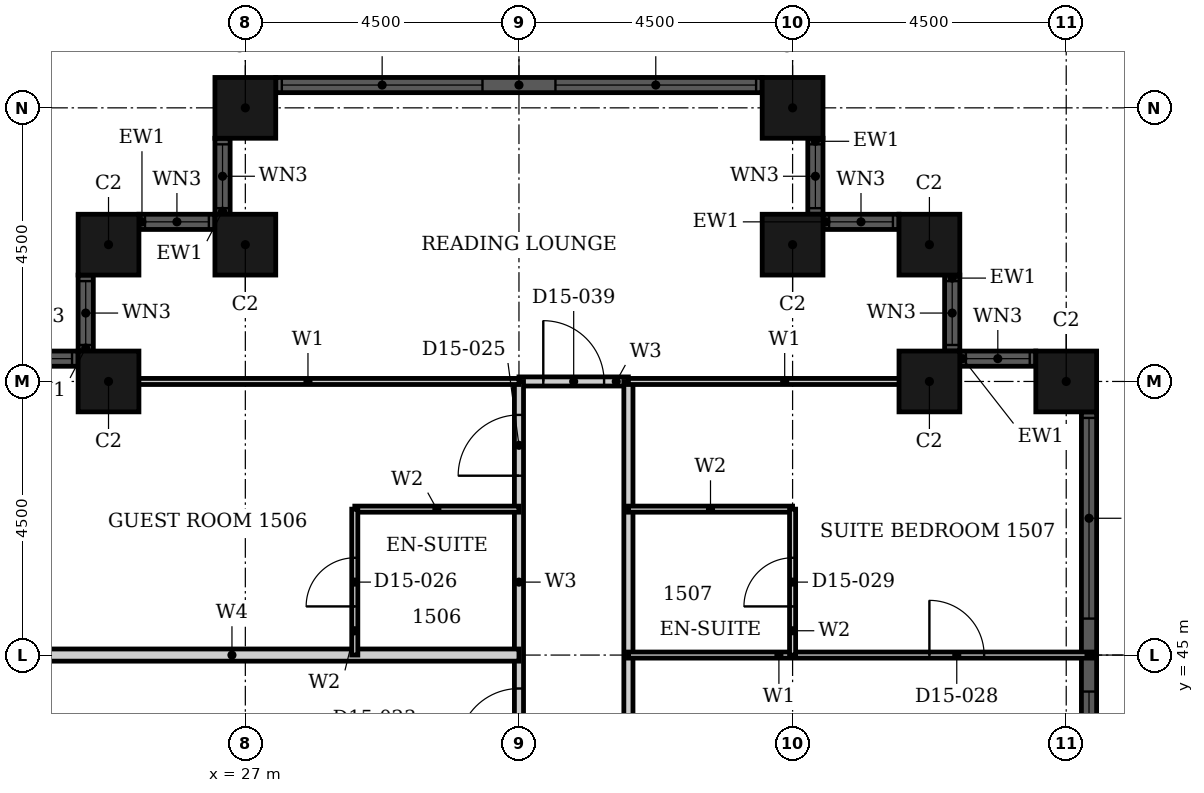
"""IFC4 building model, lengths in metres.
Left out: names, types, materials, properties, quantities, classifications, styles, units other than length and angle.
Written with IfcOpenShell. Run it as: python <this file> out.ifc"""

import sys

from ifc_helpers import new_model, si_unit, direction, frame, frame_2d, origin, origin_2d, place, context, subcontext, project, spatial, rectangle, hollow_rectangle, extrude, element, fill, save


model = new_model("IFC4")
c1 = context("Model", 3, precision=1e-05, world=origin(), true_north=direction((0.0, 1.0)))
c2 = subcontext(c1, "Body", "Model", "MODEL_VIEW")
j1 = project(units=[si_unit("LENGTHUNIT", "METRE"), si_unit("PLANEANGLEUNIT", "RADIAN")], contexts=[c1])
p1 = place(None, origin())
s1 = spatial("IfcSite", under=j1, at=p1, CompositionType="ELEMENT")
p2 = place(p1, origin())
s2 = spatial("IfcBuilding", under=s1, at=p2, CompositionType="ELEMENT")
p3 = place(p2, frame((0.0, 0.0, 67.2)))
s3 = spatial("IfcBuildingStorey", under=s2, at=p3, CompositionType="ELEMENT", Elevation=67.2)
for number, where, z_axis, x_axis in (
    (1, (40.5, 49.5, 0.0), (0.0, 0.0, 1.0), (1.0, 0.0, 0.0)),
    (2, (38.25, 49.5, 0.0), (0.0, 0.0, 1.0), (1.0, 0.0, 0.0)),
    (3, (38.25, 51.75, 0.0), (0.0, 0.0, 1.0), (1.0, 0.0, 0.0)),
    (4, (36.0, 51.75, 0.0), (0.0, 0.0, 1.0), (1.0, 0.0, 0.0)),
    (5, (36.0, 54.0, 0.0), (0.0, 0.0, 1.0), (1.0, 0.0, 0.0)),
    (6, (27.0, 54.0, 0.0), (0.0, 0.0, 1.0), (1.0, 0.0, 0.0)),
    (7, (27.0, 51.75, 0.0), (0.0, 0.0, 1.0), (1.0, 0.0, 0.0)),
    (8, (24.75, 51.75, 0.0), (0.0, 0.0, 1.0), (1.0, 0.0, 0.0)),
    (9, (24.75, 49.5, 0.0), (0.0, 0.0, 1.0), (1.0, 0.0, 0.0)),
):
    element("IfcColumn", number, at=place(p3, frame(where, z_axis=z_axis, x_axis=x_axis)), inside=s3, PredefinedType="COLUMN", context=c2, shape_type="SweptSolid", body=[
        extrude(hollow_rectangle(XDim=1.0, YDim=1.0, WallThickness=0.032, at=origin_2d()), origin(), (0.0, 0.0, 1.0), 3.6),
    ])
p4 = place(p3, frame((40.875, 41.0, 0.0), z_axis=(0.0, 0.0, 1.0), x_axis=(0.0, 1.0, 0.0)))
e10 = element("IfcWall", 10, at=p4, inside=s3, PredefinedType="SOLIDWALL", context=c2, shape_type="SweptSolid", body=[
    extrude(rectangle(XDim=8.0, YDim=0.25, at=frame_2d((4.0, 0.0))), origin(), (0.0, 0.0, 1.0), 3.6),
])
p5 = place(p4, frame((0.1, 0.0, 0.9)))
e11 = element("IfcOpeningElement", 11, at=p5, cuts=e10, PredefinedType="OPENING", context=c2, shape_type="SweptSolid", body=[
    extrude(rectangle(XDim=3.3, YDim=2.08, at=frame_2d((1.65, 1.04))), frame((0.0, 0.135, 0.0), z_axis=(0.0, -1.0, 0.0), x_axis=(1.0, 0.0, 0.0)), (0.0, 0.0, 1.0), 0.27),
])
p6 = place(p4, frame((4.6, 0.0, 0.9)))
e12 = element("IfcOpeningElement", 12, at=p6, cuts=e10, PredefinedType="OPENING", context=c2, shape_type="SweptSolid", body=[
    extrude(rectangle(XDim=3.3, YDim=2.08, at=frame_2d((1.65, 1.04))), frame((0.0, 0.135, 0.0), z_axis=(0.0, -1.0, 0.0), x_axis=(1.0, 0.0, 0.0)), (0.0, 0.0, 1.0), 0.27),
])
p7 = place(p3, frame((40.0, 49.875, 0.0), z_axis=(0.0, 0.0, 1.0), x_axis=(-1.0, 0.0, 0.0)))
e13 = element("IfcWall", 13, at=p7, inside=s3, PredefinedType="SOLIDWALL", context=c2, shape_type="SweptSolid", body=[
    extrude(rectangle(XDim=1.25, YDim=0.25, at=frame_2d((0.625, 0.0))), origin(), (0.0, 0.0, 1.0), 3.6),
])
p8 = place(p7, frame((0.1, 0.0, 0.9)))
e14 = element("IfcOpeningElement", 14, at=p8, cuts=e13, PredefinedType="OPENING", context=c2, shape_type="SweptSolid", body=[
    extrude(rectangle(XDim=1.05, YDim=2.08, at=frame_2d((0.525, 1.04))), frame((0.0, 0.135, 0.0), z_axis=(0.0, -1.0, 0.0), x_axis=(1.0, 0.0, 0.0)), (0.0, 0.0, 1.0), 0.27),
])
p9 = place(p3, frame((38.625, 50.0, 0.0), z_axis=(0.0, 0.0, 1.0), x_axis=(0.0, 1.0, 0.0)))
e15 = element("IfcWall", 15, at=p9, inside=s3, PredefinedType="SOLIDWALL", context=c2, shape_type="SweptSolid", body=[
    extrude(rectangle(XDim=1.25, YDim=0.25, at=frame_2d((0.625, 0.0))), origin(), (0.0, 0.0, 1.0), 3.6),
])
p10 = place(p9, frame((0.1, 0.0, 0.9)))
e16 = element("IfcOpeningElement", 16, at=p10, cuts=e15, PredefinedType="OPENING", context=c2, shape_type="SweptSolid", body=[
    extrude(rectangle(XDim=1.05, YDim=2.08, at=frame_2d((0.525, 1.04))), frame((0.0, 0.135, 0.0), z_axis=(0.0, -1.0, 0.0), x_axis=(1.0, 0.0, 0.0)), (0.0, 0.0, 1.0), 0.27),
])
p11 = place(p3, frame((37.75, 52.125, 0.0), z_axis=(0.0, 0.0, 1.0), x_axis=(-1.0, 0.0, 0.0)))
e17 = element("IfcWall", 17, at=p11, inside=s3, PredefinedType="SOLIDWALL", context=c2, shape_type="SweptSolid", body=[
    extrude(rectangle(XDim=1.25, YDim=0.25, at=frame_2d((0.625, 0.0))), origin(), (0.0, 0.0, 1.0), 3.6),
])
p12 = place(p11, frame((0.1, 0.0, 0.9)))
e18 = element("IfcOpeningElement", 18, at=p12, cuts=e17, PredefinedType="OPENING", context=c2, shape_type="SweptSolid", body=[
    extrude(rectangle(XDim=1.05, YDim=2.08, at=frame_2d((0.525, 1.04))), frame((0.0, 0.135, 0.0), z_axis=(0.0, -1.0, 0.0), x_axis=(1.0, 0.0, 0.0)), (0.0, 0.0, 1.0), 0.27),
])
p13 = place(p3, frame((36.375, 52.25, 0.0), z_axis=(0.0, 0.0, 1.0), x_axis=(0.0, 1.0, 0.0)))
e19 = element("IfcWall", 19, at=p13, inside=s3, PredefinedType="SOLIDWALL", context=c2, shape_type="SweptSolid", body=[
    extrude(rectangle(XDim=1.25, YDim=0.25, at=frame_2d((0.625, 0.0))), origin(), (0.0, 0.0, 1.0), 3.6),
])
p14 = place(p13, frame((0.1, 0.0, 0.9)))
e20 = element("IfcOpeningElement", 20, at=p14, cuts=e19, PredefinedType="OPENING", context=c2, shape_type="SweptSolid", body=[
    extrude(rectangle(XDim=1.05, YDim=2.08, at=frame_2d((0.525, 1.04))), frame((0.0, 0.135, 0.0), z_axis=(0.0, -1.0, 0.0), x_axis=(1.0, 0.0, 0.0)), (0.0, 0.0, 1.0), 0.27),
])
p15 = place(p3, frame((35.5, 54.375, 0.0), z_axis=(0.0, 0.0, 1.0), x_axis=(-1.0, 0.0, 0.0)))
e21 = element("IfcWall", 21, at=p15, inside=s3, PredefinedType="SOLIDWALL", context=c2, shape_type="SweptSolid", body=[
    extrude(rectangle(XDim=8.0, YDim=0.25, at=frame_2d((4.0, 0.0))), origin(), (0.0, 0.0, 1.0), 3.6),
])
p16 = place(p15, frame((0.1, 0.0, 0.9)))
e22 = element("IfcOpeningElement", 22, at=p16, cuts=e21, PredefinedType="OPENING", context=c2, shape_type="SweptSolid", body=[
    extrude(rectangle(XDim=3.3, YDim=2.08, at=frame_2d((1.65, 1.04))), frame((0.0, 0.135, 0.0), z_axis=(0.0, -1.0, 0.0), x_axis=(1.0, 0.0, 0.0)), (0.0, 0.0, 1.0), 0.27),
])
p17 = place(p15, frame((4.6, 0.0, 0.9)))
e23 = element("IfcOpeningElement", 23, at=p17, cuts=e21, PredefinedType="OPENING", context=c2, shape_type="SweptSolid", body=[
    extrude(rectangle(XDim=3.3, YDim=2.08, at=frame_2d((1.65, 1.04))), frame((0.0, 0.135, 0.0), z_axis=(0.0, -1.0, 0.0), x_axis=(1.0, 0.0, 0.0)), (0.0, 0.0, 1.0), 0.27),
])
p18 = place(p3, frame((26.625, 53.5, 0.0), z_axis=(0.0, 0.0, 1.0), x_axis=(0.0, -1.0, 0.0)))
e24 = element("IfcWall", 24, at=p18, inside=s3, PredefinedType="SOLIDWALL", context=c2, shape_type="SweptSolid", body=[
    extrude(rectangle(XDim=1.25, YDim=0.25, at=frame_2d((0.625, 0.0))), origin(), (0.0, 0.0, 1.0), 3.6),
])
p19 = place(p18, frame((0.1, 0.0, 0.9)))
e25 = element("IfcOpeningElement", 25, at=p19, cuts=e24, PredefinedType="OPENING", context=c2, shape_type="SweptSolid", body=[
    extrude(rectangle(XDim=1.05, YDim=2.08, at=frame_2d((0.525, 1.04))), frame((0.0, 0.135, 0.0), z_axis=(0.0, -1.0, 0.0), x_axis=(1.0, 0.0, 0.0)), (0.0, 0.0, 1.0), 0.27),
])
p20 = place(p3, frame((26.5, 52.125, 0.0), z_axis=(0.0, 0.0, 1.0), x_axis=(-1.0, 0.0, 0.0)))
e26 = element("IfcWall", 26, at=p20, inside=s3, PredefinedType="SOLIDWALL", context=c2, shape_type="SweptSolid", body=[
    extrude(rectangle(XDim=1.25, YDim=0.25, at=frame_2d((0.625, 0.0))), origin(), (0.0, 0.0, 1.0), 3.6),
])
p21 = place(p20, frame((0.1, 0.0, 0.9)))
e27 = element("IfcOpeningElement", 27, at=p21, cuts=e26, PredefinedType="OPENING", context=c2, shape_type="SweptSolid", body=[
    extrude(rectangle(XDim=1.05, YDim=2.08, at=frame_2d((0.525, 1.04))), frame((0.0, 0.135, 0.0), z_axis=(0.0, -1.0, 0.0), x_axis=(1.0, 0.0, 0.0)), (0.0, 0.0, 1.0), 0.27),
])
p22 = place(p3, frame((24.375, 51.25, 0.0), z_axis=(0.0, 0.0, 1.0), x_axis=(0.0, -1.0, 0.0)))
e28 = element("IfcWall", 28, at=p22, inside=s3, PredefinedType="SOLIDWALL", context=c2, shape_type="SweptSolid", body=[
    extrude(rectangle(XDim=1.25, YDim=0.25, at=frame_2d((0.625, 0.0))), origin(), (0.0, 0.0, 1.0), 3.6),
])
p23 = place(p22, frame((0.1, 0.0, 0.9)))
e29 = element("IfcOpeningElement", 29, at=p23, cuts=e28, PredefinedType="OPENING", context=c2, shape_type="SweptSolid", body=[
    extrude(rectangle(XDim=1.05, YDim=2.08, at=frame_2d((0.525, 1.04))), frame((0.0, 0.135, 0.0), z_axis=(0.0, -1.0, 0.0), x_axis=(1.0, 0.0, 0.0)), (0.0, 0.0, 1.0), 0.27),
])
p24 = place(p3, frame((24.25, 49.875, 0.0), z_axis=(0.0, 0.0, 1.0), x_axis=(-1.0, 0.0, 0.0)))
e30 = element("IfcWall", 30, at=p24, inside=s3, PredefinedType="SOLIDWALL", context=c2, shape_type="SweptSolid", body=[
    extrude(rectangle(XDim=1.25, YDim=0.25, at=frame_2d((0.625, 0.0))), origin(), (0.0, 0.0, 1.0), 3.6),
])
p25 = place(p24, frame((0.1, 0.0, 0.9)))
e31 = element("IfcOpeningElement", 31, at=p25, cuts=e30, PredefinedType="OPENING", context=c2, shape_type="SweptSolid", body=[
    extrude(rectangle(XDim=1.05, YDim=2.08, at=frame_2d((0.525, 1.04))), frame((0.0, 0.135, 0.0), z_axis=(0.0, -1.0, 0.0), x_axis=(1.0, 0.0, 0.0)), (0.0, 0.0, 1.0), 0.27),
])
p26 = place(p3, frame((31.5, 49.5, 0.0), z_axis=(0.0, 0.0, 1.0), x_axis=(1.0, 0.0, 0.0)))
e32 = element("IfcWall", 32, at=p26, inside=s3, PredefinedType="PARTITIONING", context=c2, shape_type="SweptSolid", body=[
    extrude(rectangle(XDim=1.8, YDim=0.15, at=frame_2d((0.9, 0.0))), origin(), (0.0, 0.0, 1.0), 3.3),
])
p27 = place(p26, frame((0.4, 0.0, 0.0)))
e33 = element("IfcOpeningElement", 33, at=p27, cuts=e32, PredefinedType="OPENING", context=c2, shape_type="SweptSolid", body=[
    extrude(rectangle(XDim=1.0, YDim=2.1, at=frame_2d((0.5, 1.05))), frame((0.0, 0.085, 0.0), z_axis=(0.0, -1.0, 0.0), x_axis=(1.0, 0.0, 0.0)), (0.0, 0.0, 1.0), 0.17),
])
p28 = place(p3, frame((31.5, 40.5, 0.0), z_axis=(0.0, 0.0, 1.0), x_axis=(0.0, 1.0, 0.0)))
e34 = element("IfcWall", 34, at=p28, inside=s3, PredefinedType="PARTITIONING", context=c2, shape_type="SweptSolid", body=[
    extrude(rectangle(XDim=9.0, YDim=0.15, at=frame_2d((4.5, 0.0))), origin(), (0.0, 0.0, 1.0), 2.58),
])
p29 = place(p28, frame((2.95, 0.0, 0.0)))
e35 = element("IfcOpeningElement", 35, at=p29, cuts=e34, PredefinedType="OPENING", context=c2, shape_type="SweptSolid", body=[
    extrude(rectangle(XDim=1.0, YDim=2.1, at=frame_2d((0.5, 1.05))), frame((0.0, 0.085, 0.0), z_axis=(0.0, -1.0, 0.0), x_axis=(1.0, 0.0, 0.0)), (0.0, 0.0, 1.0), 0.17),
])
p30 = place(p28, frame((7.45, 0.0, 0.0)))
e36 = element("IfcOpeningElement", 36, at=p30, cuts=e34, PredefinedType="OPENING", context=c2, shape_type="SweptSolid", body=[
    extrude(rectangle(XDim=1.0, YDim=2.1, at=frame_2d((0.5, 1.05))), frame((0.0, 0.085, 0.0), z_axis=(0.0, -1.0, 0.0), x_axis=(1.0, 0.0, 0.0)), (0.0, 0.0, 1.0), 0.17),
])
p31 = place(p3, frame((33.3, 33.3, 0.0), z_axis=(0.0, 0.0, 1.0), x_axis=(0.0, 1.0, 0.0)))
e37 = element("IfcWall", 37, at=p31, inside=s3, PredefinedType="PARTITIONING", context=c2, shape_type="SweptSolid", body=[
    extrude(rectangle(XDim=16.2, YDim=0.15, at=frame_2d((8.1, 0.0))), origin(), (0.0, 0.0, 1.0), 3.3),
])
p32 = place(p31, frame((8.95, 0.0, 0.0)))
e38 = element("IfcOpeningElement", 38, at=p32, cuts=e37, PredefinedType="OPENING", context=c2, shape_type="SweptSolid", body=[
    extrude(rectangle(XDim=1.0, YDim=2.1, at=frame_2d((0.5, 1.05))), frame((0.0, 0.085, 0.0), z_axis=(0.0, -1.0, 0.0), x_axis=(1.0, 0.0, 0.0)), (0.0, 0.0, 1.0), 0.17),
])
p33 = place(p3, frame((33.3, 45.0, 0.0), z_axis=(0.0, 0.0, 1.0), x_axis=(1.0, 0.0, 0.0)))
e39 = element("IfcWall", 39, at=p33, inside=s3, PredefinedType="PARTITIONING", context=c2, shape_type="SweptSolid", body=[
    extrude(rectangle(XDim=7.64, YDim=0.1, at=frame_2d((3.82, 0.0))), origin(), (0.0, 0.0, 1.0), 3.3),
])
p34 = place(p33, frame((4.95, 0.0, 0.0)))
e40 = element("IfcOpeningElement", 40, at=p34, cuts=e39, PredefinedType="OPENING", context=c2, shape_type="SweptSolid", body=[
    extrude(rectangle(XDim=0.9, YDim=2.1, at=frame_2d((0.45, 1.05))), frame((0.0, 0.06, 0.0), z_axis=(0.0, -1.0, 0.0), x_axis=(1.0, 0.0, 0.0)), (0.0, 0.0, 1.0), 0.12),
])
p35 = place(p3, frame((24.56, 49.5, 0.0), z_axis=(0.0, 0.0, 1.0), x_axis=(1.0, 0.0, 0.0)))
e41 = element("IfcWall", 41, at=p35, inside=s3, PredefinedType="PARTITIONING", context=c2, shape_type="SweptSolid", body=[
    extrude(rectangle(XDim=6.94, YDim=0.1, at=frame_2d((3.47, 0.0))), origin(), (0.0, 0.0, 1.0), 3.3),
])
p36 = place(p3, frame((33.3, 49.5, 0.0), z_axis=(0.0, 0.0, 1.0), x_axis=(1.0, 0.0, 0.0)))
e42 = element("IfcWall", 42, at=p36, inside=s3, PredefinedType="PARTITIONING", context=c2, shape_type="SweptSolid", body=[
    extrude(rectangle(XDim=5.14, YDim=0.1, at=frame_2d((2.57, 0.0))), origin(), (0.0, 0.0, 1.0), 3.3),
])
p37 = place(p3, frame((22.06, 45.0, 0.0), z_axis=(0.0, 0.0, 1.0), x_axis=(1.0, 0.0, 0.0)))
e43 = element("IfcWall", 43, at=p37, inside=s3, PredefinedType="PARTITIONING", context=c2, shape_type="SweptSolid", body=[
    extrude(rectangle(XDim=9.44, YDim=0.2, at=frame_2d((4.72, 0.0))), origin(), (0.0, 0.0, 1.0), 3.3),
])
for number, where, z_axis, x_axis in (
    (44, (28.8, 47.4, 0.0), (0.0, 0.0, 1.0), (1.0, 0.0, 0.0)),
    (45, (33.3, 47.4, 0.0), (0.0, 0.0, 1.0), (1.0, 0.0, 0.0)),
):
    element("IfcWall", number, at=place(p3, frame(where, z_axis=z_axis, x_axis=x_axis)), inside=s3, PredefinedType="PARTITIONING", context=c2, shape_type="SweptSolid", body=[
        extrude(rectangle(XDim=2.7, YDim=0.1, at=frame_2d((1.35, 0.0))), origin(), (0.0, 0.0, 1.0), 3.3),
    ])
p38 = place(p3, frame((28.8, 45.0, 0.0), z_axis=(0.0, 0.0, 1.0), x_axis=(0.0, 1.0, 0.0)))
e46 = element("IfcWall", 46, at=p38, inside=s3, PredefinedType="PARTITIONING", context=c2, shape_type="SweptSolid", body=[
    extrude(rectangle(XDim=2.4, YDim=0.1, at=frame_2d((1.2, 0.0))), origin(), (0.0, 0.0, 1.0), 3.3),
])
p39 = place(p38, frame((0.8, 0.0, 0.0)))
e47 = element("IfcOpeningElement", 47, at=p39, cuts=e46, PredefinedType="OPENING", context=c2, shape_type="SweptSolid", body=[
    extrude(rectangle(XDim=0.8, YDim=2.1, at=frame_2d((0.4, 1.05))), frame((0.0, 0.06, 0.0), z_axis=(0.0, -1.0, 0.0), x_axis=(1.0, 0.0, 0.0)), (0.0, 0.0, 1.0), 0.12),
])
p40 = place(p3, frame((36.0, 45.0, 0.0), z_axis=(0.0, 0.0, 1.0), x_axis=(0.0, 1.0, 0.0)))
e48 = element("IfcWall", 48, at=p40, inside=s3, PredefinedType="PARTITIONING", context=c2, shape_type="SweptSolid", body=[
    extrude(rectangle(XDim=2.4, YDim=0.1, at=frame_2d((1.2, 0.0))), origin(), (0.0, 0.0, 1.0), 2.58),
])
p41 = place(p40, frame((0.8, 0.0, 0.0)))
e49 = element("IfcOpeningElement", 49, at=p41, cuts=e48, PredefinedType="OPENING", context=c2, shape_type="SweptSolid", body=[
    extrude(rectangle(XDim=0.8, YDim=2.1, at=frame_2d((0.4, 1.05))), frame((0.0, 0.06, 0.0), z_axis=(0.0, -1.0, 0.0), x_axis=(1.0, 0.0, 0.0)), (0.0, 0.0, 1.0), 0.12),
])
p42 = place(p5, origin())
e50 = element("IfcWindow", 50, at=p42, inside=s3, PartitioningType="SINGLE_PANEL", PredefinedType="WINDOW", context=c2, shape_type="SweptSolid", body=[
    extrude(rectangle(XDim=3.3, YDim=2.08, at=frame_2d((1.65, 1.04))), frame((0.0, 0.03, 0.0), z_axis=(0.0, -1.0, 0.0), x_axis=(1.0, 0.0, 0.0)), (0.0, 0.0, 1.0), 0.06),
])
fill(e11, e50)
p43 = place(p6, origin())
e51 = element("IfcWindow", 51, at=p43, inside=s3, PartitioningType="SINGLE_PANEL", PredefinedType="WINDOW", context=c2, shape_type="SweptSolid", body=[
    extrude(rectangle(XDim=3.3, YDim=2.08, at=frame_2d((1.65, 1.04))), frame((0.0, 0.03, 0.0), z_axis=(0.0, -1.0, 0.0), x_axis=(1.0, 0.0, 0.0)), (0.0, 0.0, 1.0), 0.06),
])
fill(e12, e51)
p44 = place(p8, origin())
e52 = element("IfcWindow", 52, at=p44, inside=s3, PartitioningType="SINGLE_PANEL", PredefinedType="WINDOW", context=c2, shape_type="SweptSolid", body=[
    extrude(rectangle(XDim=1.05, YDim=2.08, at=frame_2d((0.525, 1.04))), frame((0.0, 0.03, 0.0), z_axis=(0.0, -1.0, 0.0), x_axis=(1.0, 0.0, 0.0)), (0.0, 0.0, 1.0), 0.06),
])
fill(e14, e52)
p45 = place(p10, origin())
e53 = element("IfcWindow", 53, at=p45, inside=s3, PartitioningType="SINGLE_PANEL", PredefinedType="WINDOW", context=c2, shape_type="SweptSolid", body=[
    extrude(rectangle(XDim=1.05, YDim=2.08, at=frame_2d((0.525, 1.04))), frame((0.0, 0.03, 0.0), z_axis=(0.0, -1.0, 0.0), x_axis=(1.0, 0.0, 0.0)), (0.0, 0.0, 1.0), 0.06),
])
fill(e16, e53)
p46 = place(p12, origin())
e54 = element("IfcWindow", 54, at=p46, inside=s3, PartitioningType="SINGLE_PANEL", PredefinedType="WINDOW", context=c2, shape_type="SweptSolid", body=[
    extrude(rectangle(XDim=1.05, YDim=2.08, at=frame_2d((0.525, 1.04))), frame((0.0, 0.03, 0.0), z_axis=(0.0, -1.0, 0.0), x_axis=(1.0, 0.0, 0.0)), (0.0, 0.0, 1.0), 0.06),
])
fill(e18, e54)
p47 = place(p14, origin())
e55 = element("IfcWindow", 55, at=p47, inside=s3, PartitioningType="SINGLE_PANEL", PredefinedType="WINDOW", context=c2, shape_type="SweptSolid", body=[
    extrude(rectangle(XDim=1.05, YDim=2.08, at=frame_2d((0.525, 1.04))), frame((0.0, 0.03, 0.0), z_axis=(0.0, -1.0, 0.0), x_axis=(1.0, 0.0, 0.0)), (0.0, 0.0, 1.0), 0.06),
])
fill(e20, e55)
p48 = place(p16, origin())
e56 = element("IfcWindow", 56, at=p48, inside=s3, PartitioningType="SINGLE_PANEL", PredefinedType="WINDOW", context=c2, shape_type="SweptSolid", body=[
    extrude(rectangle(XDim=3.3, YDim=2.08, at=frame_2d((1.65, 1.04))), frame((0.0, 0.03, 0.0), z_axis=(0.0, -1.0, 0.0), x_axis=(1.0, 0.0, 0.0)), (0.0, 0.0, 1.0), 0.06),
])
fill(e22, e56)
p49 = place(p17, origin())
e57 = element("IfcWindow", 57, at=p49, inside=s3, PartitioningType="SINGLE_PANEL", PredefinedType="WINDOW", context=c2, shape_type="SweptSolid", body=[
    extrude(rectangle(XDim=3.3, YDim=2.08, at=frame_2d((1.65, 1.04))), frame((0.0, 0.03, 0.0), z_axis=(0.0, -1.0, 0.0), x_axis=(1.0, 0.0, 0.0)), (0.0, 0.0, 1.0), 0.06),
])
fill(e23, e57)
p50 = place(p19, origin())
e58 = element("IfcWindow", 58, at=p50, inside=s3, PartitioningType="SINGLE_PANEL", PredefinedType="WINDOW", context=c2, shape_type="SweptSolid", body=[
    extrude(rectangle(XDim=1.05, YDim=2.08, at=frame_2d((0.525, 1.04))), frame((0.0, 0.03, 0.0), z_axis=(0.0, -1.0, 0.0), x_axis=(1.0, 0.0, 0.0)), (0.0, 0.0, 1.0), 0.06),
])
fill(e25, e58)
p51 = place(p21, origin())
e59 = element("IfcWindow", 59, at=p51, inside=s3, PartitioningType="SINGLE_PANEL", PredefinedType="WINDOW", context=c2, shape_type="SweptSolid", body=[
    extrude(rectangle(XDim=1.05, YDim=2.08, at=frame_2d((0.525, 1.04))), frame((0.0, 0.03, 0.0), z_axis=(0.0, -1.0, 0.0), x_axis=(1.0, 0.0, 0.0)), (0.0, 0.0, 1.0), 0.06),
])
fill(e27, e59)
p52 = place(p23, origin())
e60 = element("IfcWindow", 60, at=p52, inside=s3, PartitioningType="SINGLE_PANEL", PredefinedType="WINDOW", context=c2, shape_type="SweptSolid", body=[
    extrude(rectangle(XDim=1.05, YDim=2.08, at=frame_2d((0.525, 1.04))), frame((0.0, 0.03, 0.0), z_axis=(0.0, -1.0, 0.0), x_axis=(1.0, 0.0, 0.0)), (0.0, 0.0, 1.0), 0.06),
])
fill(e29, e60)
p53 = place(p25, origin())
e61 = element("IfcWindow", 61, at=p53, inside=s3, PartitioningType="SINGLE_PANEL", PredefinedType="WINDOW", context=c2, shape_type="SweptSolid", body=[
    extrude(rectangle(XDim=1.05, YDim=2.08, at=frame_2d((0.525, 1.04))), frame((0.0, 0.03, 0.0), z_axis=(0.0, -1.0, 0.0), x_axis=(1.0, 0.0, 0.0)), (0.0, 0.0, 1.0), 0.06),
])
fill(e31, e61)
p54 = place(p29, origin())
e62 = element("IfcDoor", 62, at=p54, inside=s3, OperationType="SINGLE_SWING_RIGHT", PredefinedType="DOOR", context=c2, shape_type="SweptSolid", body=[
    extrude(rectangle(XDim=1.0, YDim=2.1, at=frame_2d((0.5, 1.05))), frame((0.0, 0.025, 0.0), z_axis=(0.0, -1.0, 0.0), x_axis=(1.0, 0.0, 0.0)), (0.0, 0.0, 1.0), 0.05),
])
fill(e35, e62)
p55 = place(p30, origin())
e63 = element("IfcDoor", 63, at=p55, inside=s3, OperationType="SINGLE_SWING_RIGHT", PredefinedType="DOOR", context=c2, shape_type="SweptSolid", body=[
    extrude(rectangle(XDim=1.0, YDim=2.1, at=frame_2d((0.5, 1.05))), frame((0.0, 0.025, 0.0), z_axis=(0.0, -1.0, 0.0), x_axis=(1.0, 0.0, 0.0)), (0.0, 0.0, 1.0), 0.05),
])
fill(e36, e63)
p56 = place(p39, origin())
e64 = element("IfcDoor", 64, at=p56, inside=s3, OperationType="SINGLE_SWING_RIGHT", PredefinedType="DOOR", context=c2, shape_type="SweptSolid", body=[
    extrude(rectangle(XDim=0.8, YDim=2.1, at=frame_2d((0.4, 1.05))), frame((0.0, 0.025, 0.0), z_axis=(0.0, -1.0, 0.0), x_axis=(1.0, 0.0, 0.0)), (0.0, 0.0, 1.0), 0.05),
])
fill(e47, e64)
p57 = place(p34, origin())
e65 = element("IfcDoor", 65, at=p57, inside=s3, OperationType="SINGLE_SWING_RIGHT", PredefinedType="DOOR", context=c2, shape_type="SweptSolid", body=[
    extrude(rectangle(XDim=0.9, YDim=2.1, at=frame_2d((0.45, 1.05))), frame((0.0, 0.025, 0.0), z_axis=(0.0, -1.0, 0.0), x_axis=(1.0, 0.0, 0.0)), (0.0, 0.0, 1.0), 0.05),
])
fill(e40, e65)
p58 = place(p41, origin())
e66 = element("IfcDoor", 66, at=p58, inside=s3, OperationType="SINGLE_SWING_RIGHT", PredefinedType="DOOR", context=c2, shape_type="SweptSolid", body=[
    extrude(rectangle(XDim=0.8, YDim=2.1, at=frame_2d((0.4, 1.05))), frame((0.0, 0.025, 0.0), z_axis=(0.0, -1.0, 0.0), x_axis=(1.0, 0.0, 0.0)), (0.0, 0.0, 1.0), 0.05),
])
fill(e49, e66)
p59 = place(p27, origin())
e67 = element("IfcDoor", 67, at=p59, inside=s3, OperationType="SINGLE_SWING_RIGHT", PredefinedType="DOOR", context=c2, shape_type="SweptSolid", body=[
    extrude(rectangle(XDim=1.0, YDim=2.1, at=frame_2d((0.5, 1.05))), frame((0.0, 0.025, 0.0), z_axis=(0.0, -1.0, 0.0), x_axis=(1.0, 0.0, 0.0)), (0.0, 0.0, 1.0), 0.05),
])
fill(e33, e67)
save(model, sys.argv[1])
